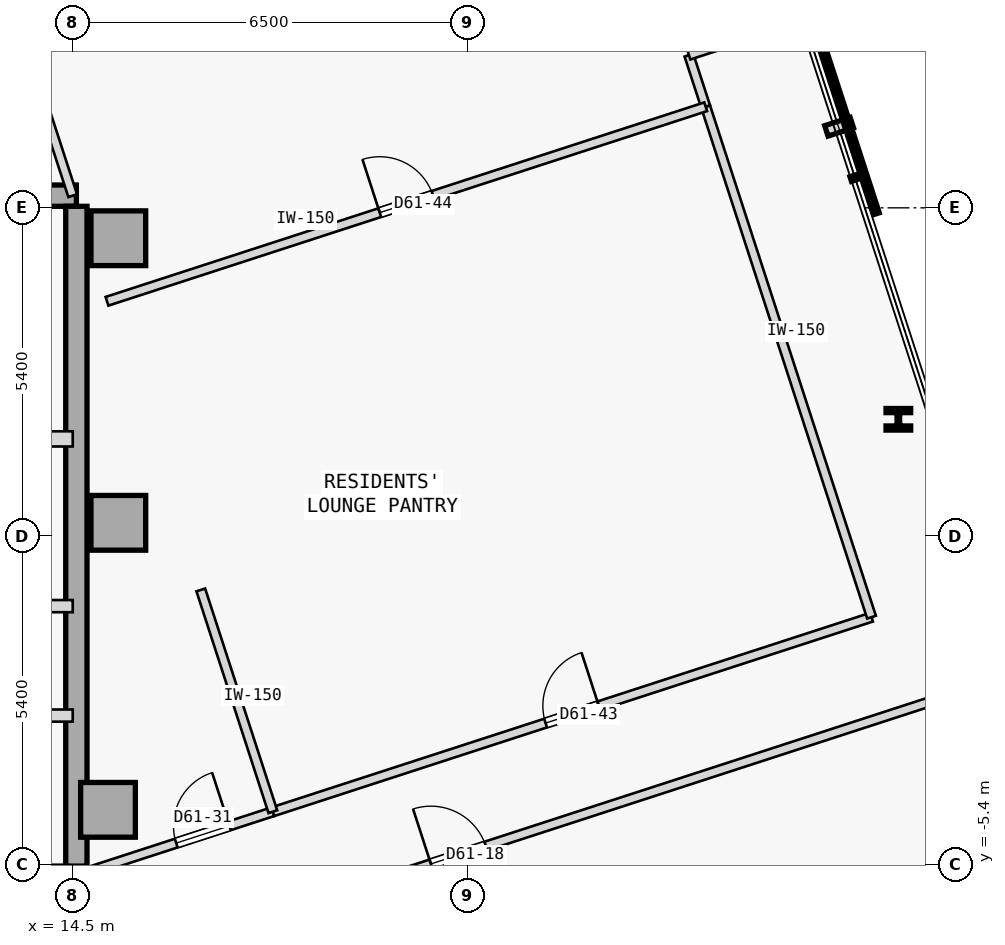
"""IFC4 building model, lengths in metres.
Left out: names, types, materials, properties, quantities, classifications, styles, units other than length and angle.
Written with IfcOpenShell. Run it as: python <this file> out.ifc"""

import sys

from ifc_helpers import new_model, si_unit, direction, frame, frame_2d, origin, origin_2d, place, context, subcontext, project, spatial, rectangle, i_section, extrude, element, fill, save


model = new_model("IFC4")
c1 = context("Model", 3, precision=1e-05, world=origin(), true_north=direction((0.0, 1.0)))
c2 = subcontext(c1, "Body", "Model", "MODEL_VIEW")
j1 = project(units=[si_unit("LENGTHUNIT", "METRE"), si_unit("PLANEANGLEUNIT", "RADIAN")], contexts=[c1])
p1 = place(None, origin())
s1 = spatial("IfcSite", under=j1, at=p1, CompositionType="ELEMENT")
p2 = place(p1, origin())
s2 = spatial("IfcBuilding", under=s1, at=p2, CompositionType="ELEMENT")
p3 = place(p2, frame((0.0, 0.0, 231.0)))
s3 = spatial("IfcBuildingStorey", under=s2, at=p3, CompositionType="ELEMENT", Elevation=231.0)
for number, where, z_axis, x_axis in (
    (1, (15.25, 4.9, 0.0), (0.0, 0.0, 1.0), (1.0, 0.0, 0.0)),
    (2, (15.25, 0.22, 0.0), (0.0, 0.0, 1.0), (1.0, 0.0, 0.0)),
    (3, (15.08, -4.5, 0.0), (0.0, 0.0, 1.0), (1.0, 0.0, 0.0)),
):
    element("IfcColumn", number, at=place(p3, frame(where, z_axis=z_axis, x_axis=x_axis)), inside=s3, PredefinedType="COLUMN", context=c2, shape_type="SweptSolid", body=[
        extrude(rectangle(XDim=0.9, YDim=0.9, at=origin_2d()), origin(), (0.0, 0.0, 1.0), 3.35),
    ])
p4 = place(p3, frame((3.15, 5.6, 0.0), z_axis=(0.0, 0.0, 1.0), x_axis=(1.0, 0.0, 0.0)))
e4 = element("IfcWall", 4, at=p4, inside=s3, PredefinedType="SHEAR", context=c2, shape_type="SweptSolid", body=[
    extrude(rectangle(XDim=11.41, YDim=0.35, at=frame_2d((5.705, 0.0))), origin(), (0.0, 0.0, 1.0), 3.125),
])
p5 = place(p3, frame((14.56, -5.425, 0.0), z_axis=(0.0, 0.0, 1.0), x_axis=(0.0, 1.0, 0.0)))
e5 = element("IfcWall", 5, at=p5, inside=s3, PredefinedType="SHEAR", context=c2, shape_type="SweptSolid", body=[
    extrude(rectangle(XDim=10.85, YDim=0.35, at=frame_2d((5.425, 0.0))), origin(), (0.0, 0.0, 1.0), 3.125),
])
p6 = place(p3, frame((28.078, 1.922, 0.0), z_axis=(0.0, 0.0, 1.0), x_axis=(1.0, 0.0, 0.0)))
e6 = element("IfcColumn", 6, at=p6, inside=s3, PredefinedType="COLUMN", context=c2, shape_type="SweptSolid", body=[
    extrude(i_section(OverallWidth=0.405, OverallDepth=0.355, WebThickness=0.042, FlangeThickness=0.068, FilletRadius=0.015, at=origin_2d()), origin(), (0.0, 0.0, 1.0), 3.35),
])
p7 = place(p3, frame((10.9, 1.6, 0.0), z_axis=(0.0, 0.0, 1.0), x_axis=(1.0, 0.0, 0.0)))
e7 = element("IfcWall", 7, at=p7, inside=s3, PredefinedType="STANDARD", context=c2, shape_type="SweptSolid", body=[
    extrude(rectangle(XDim=3.6, YDim=0.25, at=frame_2d((1.8, 0.0))), origin(), (0.0, 0.0, 1.0), 3.125),
])
p8 = place(p7, frame((1.62, 0.0, 0.0)))
e8 = element("IfcOpeningElement", 8, at=p8, cuts=e7, PredefinedType="OPENING", context=c2, shape_type="SweptSolid", body=[
    extrude(rectangle(XDim=1.05, YDim=2.15, at=frame_2d((0.525, 1.075))), frame((0.0, 0.135, 0.0), z_axis=(0.0, -1.0, 0.0), x_axis=(1.0, 0.0, 0.0)), (0.0, 0.0, 1.0), 0.27),
])
p9 = place(p3, frame((11.55, -1.15, 0.0), z_axis=(0.0, 0.0, 1.0), x_axis=(1.0, 0.0, 0.0)))
e9 = element("IfcWall", 9, at=p9, inside=s3, PredefinedType="STANDARD", context=c2, shape_type="SweptSolid", body=[
    extrude(rectangle(XDim=2.95, YDim=0.2, at=frame_2d((1.475, 0.0))), origin(), (0.0, 0.0, 1.0), 3.125),
])
p10 = place(p9, frame((0.75, 0.0, 0.0)))
e10 = element("IfcOpeningElement", 10, at=p10, cuts=e9, PredefinedType="OPENING", context=c2, shape_type="SweptSolid", body=[
    extrude(rectangle(XDim=1.05, YDim=2.18, at=frame_2d((0.525, 1.09))), frame((0.0, 0.11, 0.0), z_axis=(0.0, -1.0, 0.0), x_axis=(1.0, 0.0, 0.0)), (0.0, 0.0, 1.0), 0.22),
])
p11 = place(p3, frame((3.7, -2.95, 0.0), z_axis=(0.0, 0.0, 1.0), x_axis=(1.0, 0.0, 0.0)))
e11 = element("IfcWall", 11, at=p11, inside=s3, PredefinedType="STANDARD", context=c2, shape_type="SweptSolid", body=[
    extrude(rectangle(XDim=10.8, YDim=0.2, at=frame_2d((5.4, 0.0))), origin(), (0.0, 0.0, 1.0), 3.125),
])
p12 = place(p11, frame((0.53, 0.0, 0.0)))
e12 = element("IfcOpeningElement", 12, at=p12, cuts=e11, PredefinedType="OPENING", context=c2, shape_type="SweptSolid", body=[
    extrude(rectangle(XDim=1.1, YDim=2.15, at=frame_2d((0.55, 1.075))), frame((0.0, 0.11, 0.0), z_axis=(0.0, -1.0, 0.0), x_axis=(1.0, 0.0, 0.0)), (0.0, 0.0, 1.0), 0.22),
])
p13 = place(p11, frame((3.79, 0.0, 0.0)))
e13 = element("IfcOpeningElement", 13, at=p13, cuts=e11, PredefinedType="OPENING", context=c2, shape_type="SweptSolid", body=[
    extrude(rectangle(XDim=0.92, YDim=2.15, at=frame_2d((0.46, 1.075))), frame((0.0, 0.11, 0.0), z_axis=(0.0, -1.0, 0.0), x_axis=(1.0, 0.0, 0.0)), (0.0, 0.0, 1.0), 0.22),
])
p14 = place(p11, frame((8.11, 0.0, 0.0)))
e14 = element("IfcOpeningElement", 14, at=p14, cuts=e11, PredefinedType="OPENING", context=c2, shape_type="SweptSolid", body=[
    extrude(rectangle(XDim=0.92, YDim=2.15, at=frame_2d((0.46, 1.075))), frame((0.0, 0.11, 0.0), z_axis=(0.0, -1.0, 0.0), x_axis=(1.0, 0.0, 0.0)), (0.0, 0.0, 1.0), 0.22),
])
p15 = place(p3, frame((11.669, -8.223, 0.0), z_axis=(0.0, 0.0, 1.0), x_axis=(0.951057967787, 0.309012527106, 0.0)))
e15 = element("IfcWall", 15, at=p15, inside=s3, PredefinedType="PARTITIONING", context=c2, shape_type="SweptSolid", body=[
    extrude(rectangle(XDim=19.291, YDim=0.15, at=frame_2d((9.646, 0.0))), origin(), (0.0, 0.0, 1.0), 3.125),
])
p16 = place(p15, frame((9.17, 0.0, 0.0)))
e16 = element("IfcOpeningElement", 16, at=p16, cuts=e15, PredefinedType="OPENING", context=c2, shape_type="SweptSolid", body=[
    extrude(rectangle(XDim=0.95, YDim=2.15, at=frame_2d((0.475, 1.075))), frame((0.0, 0.085, 0.0), z_axis=(0.0, -1.0, 0.0), x_axis=(1.0, 0.0, 0.0)), (0.0, 0.0, 1.0), 0.17),
])
p17 = place(p3, frame((14.5, -5.6, 0.0), z_axis=(0.0, 0.0, 1.0), x_axis=(0.951047546178, 0.309044600193, 0.0)))
e17 = element("IfcWall", 17, at=p17, inside=s3, PredefinedType="PARTITIONING", context=c2, shape_type="SweptSolid", body=[
    extrude(rectangle(XDim=3.461, YDim=0.15, at=frame_2d((1.73, 0.0))), origin(), (0.0, 0.0, 1.0), 3.125),
])
p18 = place(p17, frame((1.79, 0.0, 0.0)))
e18 = element("IfcOpeningElement", 18, at=p18, cuts=e17, PredefinedType="OPENING", context=c2, shape_type="SweptSolid", body=[
    extrude(rectangle(XDim=0.92, YDim=2.15, at=frame_2d((0.46, 1.075))), frame((0.0, 0.085, 0.0), z_axis=(0.0, -1.0, 0.0), x_axis=(1.0, 0.0, 0.0)), (0.0, 0.0, 1.0), 0.17),
])
p19 = place(p3, frame((17.791, -4.531, 0.0), z_axis=(0.0, 0.0, 1.0), x_axis=(0.951056769902, 0.309016213852, 0.0)))
e19 = element("IfcWall", 19, at=p19, inside=s3, PredefinedType="PARTITIONING", context=c2, shape_type="SweptSolid", body=[
    extrude(rectangle(XDim=10.352, YDim=0.15, at=frame_2d((5.176, 0.0))), origin(), (0.0, 0.0, 1.0), 3.125),
])
p20 = place(p19, frame((4.716, 0.0, 0.0)))
e20 = element("IfcOpeningElement", 20, at=p20, cuts=e19, PredefinedType="OPENING", context=c2, shape_type="SweptSolid", body=[
    extrude(rectangle(XDim=0.92, YDim=2.15, at=frame_2d((0.46, 1.075))), frame((0.0, 0.085, 0.0), z_axis=(0.0, -1.0, 0.0), x_axis=(1.0, 0.0, 0.0)), (0.0, 0.0, 1.0), 0.17),
])
p21 = place(p3, frame((27.637, -1.332, 0.0), z_axis=(0.0, 0.0, 1.0), x_axis=(-0.309040411618, 0.951048907253, 0.0)))
e21 = element("IfcWall", 21, at=p21, inside=s3, PredefinedType="PARTITIONING", context=c2, shape_type="SweptSolid", body=[
    extrude(rectangle(XDim=8.826, YDim=0.15, at=frame_2d((4.413, 0.0))), origin(), (0.0, 0.0, 1.0), 3.125),
])
p22 = place(p3, frame((24.909, 7.062, 0.0), z_axis=(0.0, 0.0, 1.0), x_axis=(-0.30899324298, 0.951064233263, 0.0)))
e22 = element("IfcWall", 22, at=p22, inside=s3, PredefinedType="PARTITIONING", context=c2, shape_type="SweptSolid", body=[
    extrude(rectangle(XDim=0.892, YDim=0.15, at=frame_2d((0.446, 0.0))), origin(), (0.0, 0.0, 1.0), 3.125),
])
p23 = place(p3, frame((24.634, 7.91, 0.0), z_axis=(0.0, 0.0, 1.0), x_axis=(0.951054051148, 0.309024581215, 0.0)))
e23 = element("IfcWall", 23, at=p23, inside=s3, PredefinedType="PARTITIONING", context=c2, shape_type="SweptSolid", body=[
    extrude(rectangle(XDim=1.975, YDim=0.15, at=frame_2d((0.988, 0.0))), origin(), (0.0, 0.0, 1.0), 3.125),
])
p24 = place(p3, frame((17.791, -4.531, 0.0), z_axis=(0.0, 0.0, 1.0), x_axis=(-0.309018414265, 0.951056054944, 0.0)))
e24 = element("IfcWall", 24, at=p24, inside=s3, PredefinedType="PARTITIONING", context=c2, shape_type="SweptSolid", body=[
    extrude(rectangle(XDim=3.835, YDim=0.15, at=frame_2d((1.917, 0.0))), origin(), (0.0, 0.0, 1.0), 3.125),
])
p25 = place(p3, frame((14.5, 5.6, 0.0), z_axis=(0.0, 0.0, 1.0), x_axis=(-0.308974360462, 0.951070367837, 0.0)))
e25 = element("IfcWall", 25, at=p25, inside=s3, PredefinedType="PARTITIONING", context=c2, shape_type="SweptSolid", body=[
    extrude(rectangle(XDim=4.843, YDim=0.15, at=frame_2d((2.421, 0.0))), origin(), (0.0, 0.0, 1.0), 3.125),
])
p26 = place(p3, frame((15.064, 3.863, 0.0), z_axis=(0.0, 0.0, 1.0), x_axis=(0.951061448945, 0.309001812827, 0.0)))
e26 = element("IfcWall", 26, at=p26, inside=s3, PredefinedType="PARTITIONING", context=c2, shape_type="SweptSolid", body=[
    extrude(rectangle(XDim=10.352, YDim=0.15, at=frame_2d((5.176, 0.0))), origin(), (0.0, 0.0, 1.0), 3.125),
])
p27 = place(p26, frame((4.716, 0.0, 0.0)))
e27 = element("IfcOpeningElement", 27, at=p27, cuts=e26, PredefinedType="OPENING", context=c2, shape_type="SweptSolid", body=[
    extrude(rectangle(XDim=0.92, YDim=2.15, at=frame_2d((0.46, 1.075))), frame((0.0, 0.085, 0.0), z_axis=(0.0, -1.0, 0.0), x_axis=(1.0, 0.0, 0.0)), (0.0, 0.0, 1.0), 0.17),
])
p28 = place(p16, origin())
e28 = element("IfcDoor", 28, at=p28, inside=s3, OperationType="SINGLE_SWING_LEFT", PredefinedType="DOOR", context=c2, shape_type="SweptSolid", body=[
    extrude(rectangle(XDim=0.95, YDim=2.15, at=frame_2d((0.475, 1.075))), frame((0.0, 0.025, 0.0), z_axis=(0.0, -1.0, 0.0), x_axis=(1.0, 0.0, 0.0)), (0.0, 0.0, 1.0), 0.05),
])
fill(e16, e28)
p29 = place(p18, origin())
e29 = element("IfcDoor", 29, at=p29, inside=s3, OperationType="SINGLE_SWING_RIGHT", PredefinedType="DOOR", context=c2, shape_type="SweptSolid", body=[
    extrude(rectangle(XDim=0.92, YDim=2.15, at=frame_2d((0.46, 1.075))), frame((0.0, 0.025, 0.0), z_axis=(0.0, -1.0, 0.0), x_axis=(1.0, 0.0, 0.0)), (0.0, 0.0, 1.0), 0.05),
])
fill(e18, e29)
p30 = place(p20, origin())
e30 = element("IfcDoor", 30, at=p30, inside=s3, OperationType="SINGLE_SWING_RIGHT", PredefinedType="DOOR", context=c2, shape_type="SweptSolid", body=[
    extrude(rectangle(XDim=0.92, YDim=2.15, at=frame_2d((0.46, 1.075))), frame((0.0, 0.025, 0.0), z_axis=(0.0, -1.0, 0.0), x_axis=(1.0, 0.0, 0.0)), (0.0, 0.0, 1.0), 0.05),
])
fill(e20, e30)
p31 = place(p27, origin())
e31 = element("IfcDoor", 31, at=p31, inside=s3, OperationType="SINGLE_SWING_LEFT", PredefinedType="DOOR", context=c2, shape_type="SweptSolid", body=[
    extrude(rectangle(XDim=0.92, YDim=2.15, at=frame_2d((0.46, 1.075))), frame((0.0, 0.025, 0.0), z_axis=(0.0, -1.0, 0.0), x_axis=(1.0, 0.0, 0.0)), (0.0, 0.0, 1.0), 0.05),
])
fill(e27, e31)
save(model, sys.argv[1])
